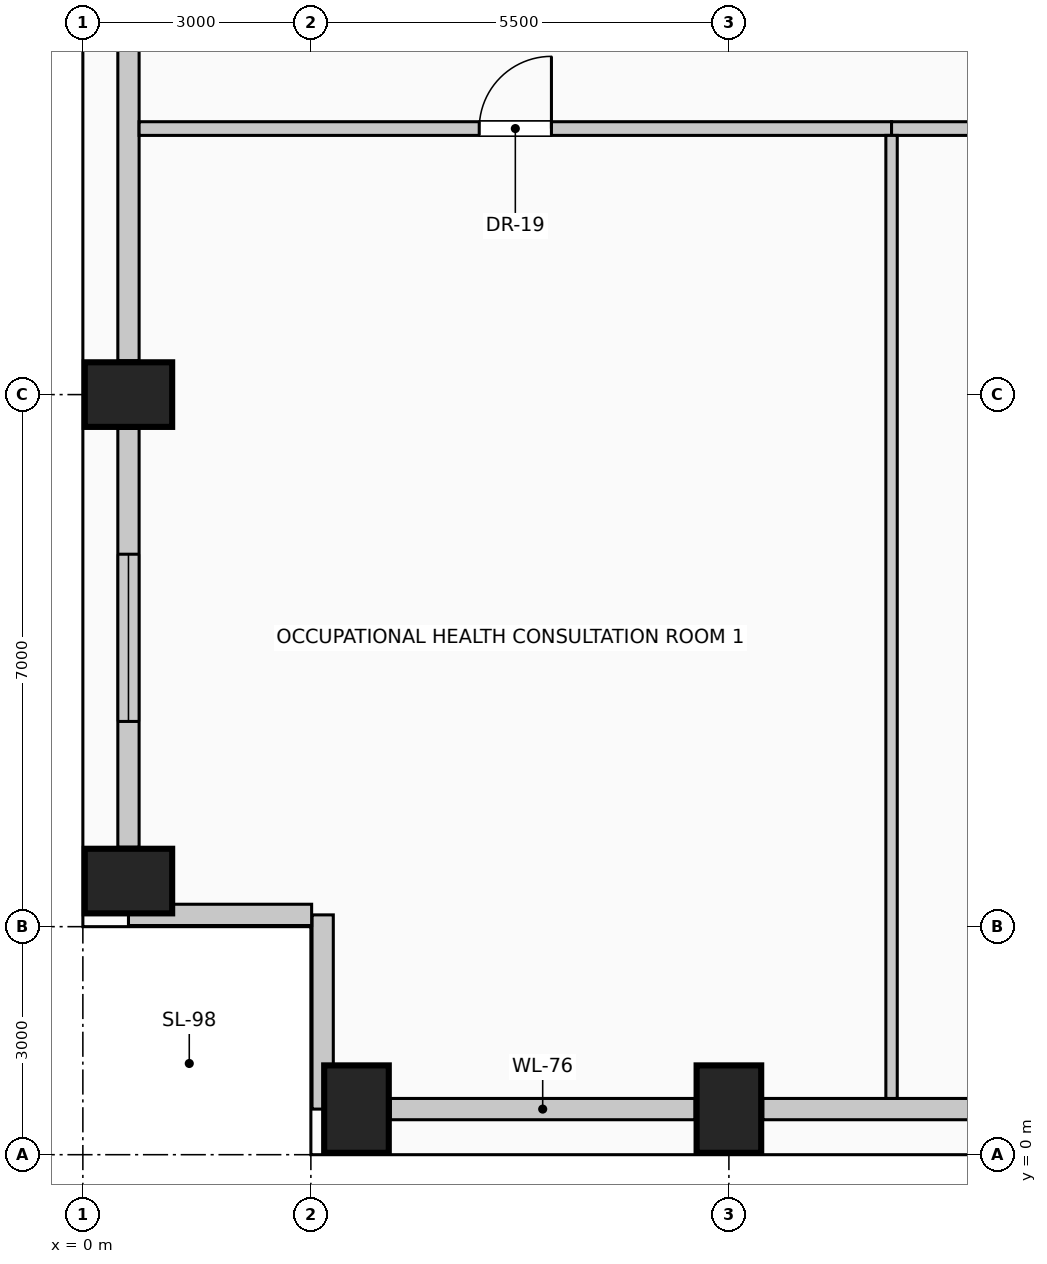
"""IFC4 building model, lengths in metres.
Left out: names, types, materials, properties, quantities, classifications, styles, units other than length and angle.
Written with IfcOpenShell. Run it as: python <this file> out.ifc"""

import sys

from ifc_helpers import new_model, si_unit, direction, frame, frame_2d, origin, origin_2d, place, context, subcontext, project, spatial, rectangle, extrude, element, fill, save


model = new_model("IFC4")
c1 = context("Model", 3, precision=1e-05, world=origin(), true_north=direction((0.0, 1.0)))
c2 = subcontext(c1, "Body", "Model", "MODEL_VIEW")
j1 = project(units=[si_unit("LENGTHUNIT", "METRE"), si_unit("PLANEANGLEUNIT", "RADIAN")], contexts=[c1])
p1 = place(None, origin())
s1 = spatial("IfcSite", under=j1, at=p1, CompositionType="ELEMENT")
p2 = place(p1, origin())
s2 = spatial("IfcBuilding", under=s1, at=p2, CompositionType="ELEMENT")
p3 = place(p2, frame((0.0, 0.0, 124.6)))
s3 = spatial("IfcBuildingStorey", under=s2, at=p3, CompositionType="ELEMENT", Elevation=124.6)
for number, where, z_axis, x_axis in (
    (1, (3.6, 0.6, 0.0), (0.0, 0.0, 1.0), (1.0, 0.0, 0.0)),
    (2, (8.5, 0.6, 0.0), (0.0, 0.0, 1.0), (1.0, 0.0, 0.0)),
    (3, (0.6, 3.6, 0.0), (0.0, 0.0, 1.0), (0.0, 1.0, 0.0)),
    (4, (0.6, 10.0, 0.0), (0.0, 0.0, 1.0), (0.0, 1.0, 0.0)),
):
    element("IfcColumn", number, at=place(p3, frame(where, z_axis=z_axis, x_axis=x_axis)), inside=s3, PredefinedType="COLUMN", context=c2, shape_type="SweptSolid", body=[
        extrude(rectangle(XDim=0.85, YDim=1.15, at=origin_2d()), origin(), (0.0, 0.0, 1.0), 4.0),
    ])
p4 = place(p3, frame((8.055, 0.6, 0.0), z_axis=(0.0, 0.0, 1.0), x_axis=(-1.0, 0.0, 0.0)))
e5 = element("IfcWall", 5, at=p4, inside=s3, PredefinedType="SOLIDWALL", context=c2, shape_type="SweptSolid", body=[
    extrude(rectangle(XDim=4.01, YDim=0.28, at=frame_2d((2.005, 0.0))), origin(), (0.0, 0.0, 1.0), 2.875),
])
p5 = place(p3, frame((13.555, 0.6, 0.0), z_axis=(0.0, 0.0, 1.0), x_axis=(-1.0, 0.0, 0.0)))
e6 = element("IfcWall", 6, at=p5, inside=s3, PredefinedType="SOLIDWALL", context=c2, shape_type="SweptSolid", body=[
    extrude(rectangle(XDim=4.61, YDim=0.28, at=frame_2d((2.305, 0.0))), origin(), (0.0, 0.0, 1.0), 2.875),
])
p6 = place(p3, frame((0.6, 4.045, 0.0), z_axis=(0.0, 0.0, 1.0), x_axis=(0.0, 1.0, 0.0)))
e7 = element("IfcWall", 7, at=p6, inside=s3, PredefinedType="SOLIDWALL", context=c2, shape_type="SweptSolid", body=[
    extrude(rectangle(XDim=5.51, YDim=0.28, at=frame_2d((2.755, 0.0))), origin(), (0.0, 0.0, 1.0), 2.875),
])
p7 = place(p6, frame((1.655, 0.0, 0.5)))
e8 = element("IfcOpeningElement", 8, at=p7, cuts=e7, PredefinedType="OPENING", context=c2, shape_type="SweptSolid", body=[
    extrude(rectangle(XDim=2.2, YDim=1.95, at=frame_2d((1.1, 0.975))), frame((0.0, 0.15, 0.0), z_axis=(0.0, -1.0, 0.0), x_axis=(1.0, 0.0, 0.0)), (0.0, 0.0, 1.0), 0.3),
])
p8 = place(p3, frame((0.6, 10.445, 0.0), z_axis=(0.0, 0.0, 1.0), x_axis=(0.0, 1.0, 0.0)))
e9 = element("IfcWall", 9, at=p8, inside=s3, PredefinedType="SOLIDWALL", context=c2, shape_type="SweptSolid", body=[
    extrude(rectangle(XDim=7.11, YDim=0.28, at=frame_2d((3.555, 0.0))), origin(), (0.0, 0.0, 1.0), 2.875),
])
p9 = place(p3, frame((3.155, 0.6, 0.0), z_axis=(0.0, 0.0, 1.0), x_axis=(0.0, 1.0, 0.0)))
e10 = element("IfcWall", 10, at=p9, inside=s3, PredefinedType="SOLIDWALL", context=c2, shape_type="SweptSolid", body=[
    extrude(rectangle(XDim=2.555, YDim=0.28, at=frame_2d((1.277, 0.0))), origin(), (0.0, 0.0, 1.0), 3.725),
])
p10 = place(p3, frame((3.01, 3.155, 0.0), z_axis=(0.0, 0.0, 1.0), x_axis=(-1.0, 0.0, 0.0)))
e11 = element("IfcWall", 11, at=p10, inside=s3, PredefinedType="SOLIDWALL", context=c2, shape_type="SweptSolid", body=[
    extrude(rectangle(XDim=2.41, YDim=0.28, at=frame_2d((1.205, 0.0))), origin(), (0.0, 0.0, 1.0), 3.725),
])
p11 = place(p3, frame((0.74, 13.5, 0.0), z_axis=(0.0, 0.0, 1.0), x_axis=(1.0, 0.0, 0.0)))
e12 = element("IfcWall", 12, at=p11, inside=s3, PredefinedType="PARTITIONING", context=c2, shape_type="SweptSolid", body=[
    extrude(rectangle(XDim=9.9, YDim=0.18, at=frame_2d((4.95, 0.0))), origin(), (0.0, 0.0, 1.0), 3.725),
])
p12 = place(p11, frame((4.475, 0.0, 0.0)))
e13 = element("IfcOpeningElement", 13, at=p12, cuts=e12, PredefinedType="OPENING", context=c2, shape_type="SweptSolid", body=[
    extrude(rectangle(XDim=0.95, YDim=2.15, at=frame_2d((0.475, 1.075))), frame((0.0, 0.1, 0.0), z_axis=(0.0, -1.0, 0.0), x_axis=(1.0, 0.0, 0.0)), (0.0, 0.0, 1.0), 0.2),
])
p13 = place(p3, frame((10.64, 13.5, 0.0), z_axis=(0.0, 0.0, 1.0), x_axis=(1.0, 0.0, 0.0)))
e14 = element("IfcWall", 14, at=p13, inside=s3, PredefinedType="PARTITIONING", context=c2, shape_type="SweptSolid", body=[
    extrude(rectangle(XDim=4.72, YDim=0.18, at=frame_2d((2.36, 0.0))), origin(), (0.0, 0.0, 1.0), 3.725),
])
p14 = place(p13, frame((1.835, 0.0, 0.0)))
e15 = element("IfcOpeningElement", 15, at=p14, cuts=e14, PredefinedType="OPENING", context=c2, shape_type="SweptSolid", body=[
    extrude(rectangle(XDim=1.05, YDim=2.15, at=frame_2d((0.525, 1.075))), frame((0.0, 0.1, 0.0), z_axis=(0.0, -1.0, 0.0), x_axis=(1.0, 0.0, 0.0)), (0.0, 0.0, 1.0), 0.2),
])
p15 = place(p3, frame((10.64, 0.74, 0.0), z_axis=(0.0, 0.0, 1.0), x_axis=(0.0, 1.0, 0.0)))
e16 = element("IfcWall", 16, at=p15, inside=s3, PredefinedType="PARTITIONING", context=c2, shape_type="SweptSolid", body=[
    extrude(rectangle(XDim=12.67, YDim=0.15, at=frame_2d((6.335, 0.0))), origin(), (0.0, 0.0, 1.0), 3.725),
])
p16 = place(p7, origin())
e17 = element("IfcWindow", 17, at=p16, inside=s3, PartitioningType="SINGLE_PANEL", PredefinedType="WINDOW", context=c2, shape_type="SweptSolid", body=[
    extrude(rectangle(XDim=2.2, YDim=1.95, at=frame_2d((1.1, 0.975))), frame((0.0, 0.03, 0.0), z_axis=(0.0, -1.0, 0.0), x_axis=(1.0, 0.0, 0.0)), (0.0, 0.0, 1.0), 0.06),
])
fill(e8, e17)
p17 = place(p12, origin())
e18 = element("IfcDoor", 18, at=p17, inside=s3, OperationType="SINGLE_SWING_RIGHT", PredefinedType="DOOR", context=c2, shape_type="SweptSolid", body=[
    extrude(rectangle(XDim=0.95, YDim=2.15, at=frame_2d((0.475, 1.075))), frame((0.0, 0.025, 0.0), z_axis=(0.0, -1.0, 0.0), x_axis=(1.0, 0.0, 0.0)), (0.0, 0.0, 1.0), 0.05),
])
fill(e13, e18)
save(model, sys.argv[1])
